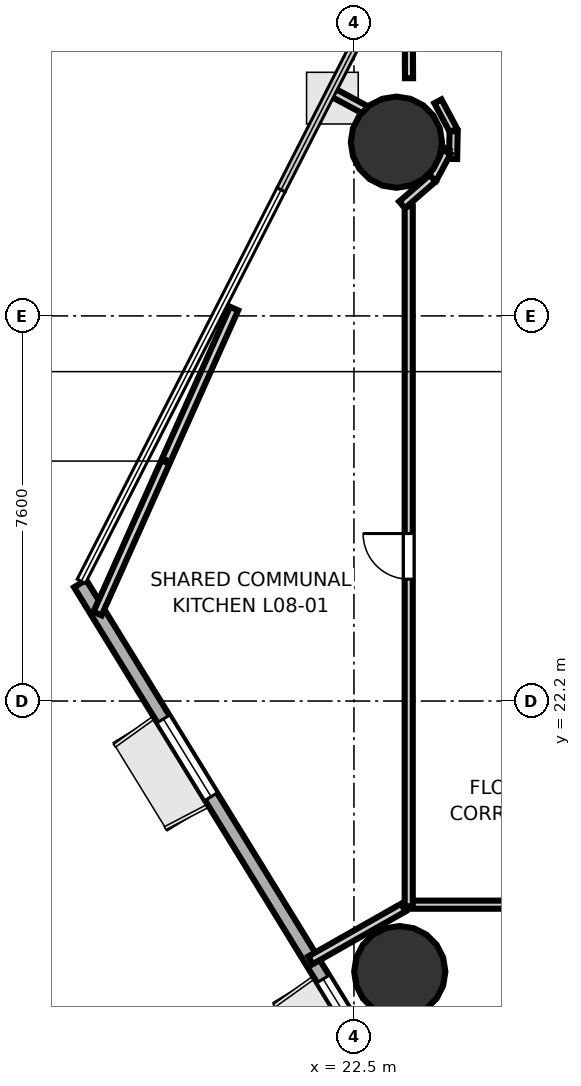
"""IFC4 building model, lengths in metres.
Left out: names, types, materials, properties, quantities, classifications, styles, units other than length and angle.
Written with IfcOpenShell. Run it as: python <this file> out.ifc"""

import sys

from ifc_helpers import new_model, si_unit, direction, frame, frame_2d, origin, origin_2d, place, context, subcontext, project, spatial, rectangle, hollow_circle, extrude, element, fill, save


model = new_model("IFC4")
c1 = context("Model", 3, precision=1e-05, world=origin(), true_north=direction((0.0, 1.0)))
c2 = subcontext(c1, "Body", "Model", "MODEL_VIEW")
j1 = project(units=[si_unit("LENGTHUNIT", "METRE"), si_unit("PLANEANGLEUNIT", "RADIAN")], contexts=[c1])
p1 = place(None, origin())
s1 = spatial("IfcSite", under=j1, at=p1, CompositionType="ELEMENT")
p2 = place(p1, origin())
s2 = spatial("IfcBuilding", under=s1, at=p2, CompositionType="ELEMENT")
p3 = place(p2, frame((0.0, 0.0, 36.8)))
s3 = spatial("IfcBuildingStorey", under=s2, at=p3, CompositionType="ELEMENT", Elevation=36.8)
for number, where, z_axis, x_axis in (
    (1, (23.338, 33.228, 0.0), (0.0, 0.0, 1.0), (1.0, 0.0, 0.0)),
    (2, (23.404, 16.86, 0.0), (0.0, 0.0, 1.0), (1.0, 0.0, 0.0)),
):
    element("IfcColumn", number, at=place(p3, frame(where, z_axis=z_axis, x_axis=x_axis)), inside=s3, PredefinedType="COLUMN", context=c2, shape_type="SweptSolid", body=[
        extrude(hollow_circle(Radius=0.9, WallThickness=0.045, at=origin_2d()), origin(), (0.0, 0.0, 1.0), 3.7),
    ])
p4 = place(p3, frame((17.096, 24.519, 0.0), z_axis=(0.0, 0.0, 1.0), x_axis=(0.523599306322, -0.851964650921, 0.0)))
e3 = element("IfcWall", 3, at=p4, inside=s3, PredefinedType="SOLIDWALL", context=c2, shape_type="SweptSolid", body=[
    extrude(rectangle(XDim=13.457, YDim=0.28, at=frame_2d((6.728, 0.0))), origin(), (0.0, 0.0, 1.0), 3.52),
])
p5 = place(p4, frame((3.137, 0.0, 0.85)))
e4 = element("IfcOpeningElement", 4, at=p5, cuts=e3, PredefinedType="OPENING", context=c2, shape_type="SweptSolid", body=[
    extrude(rectangle(XDim=1.8, YDim=2.1, at=frame_2d((0.9, 1.05))), frame((0.0, 0.15, 0.0), z_axis=(0.0, -1.0, 0.0), x_axis=(1.0, 0.0, 0.0)), (0.0, 0.0, 1.0), 0.3),
])
p6 = place(p4, frame((9.16, 0.0, 0.85)))
e5 = element("IfcOpeningElement", 5, at=p6, cuts=e3, PredefinedType="OPENING", context=c2, shape_type="SweptSolid", body=[
    extrude(rectangle(XDim=1.8, YDim=2.1, at=frame_2d((0.9, 1.05))), frame((0.0, 0.15, 0.0), z_axis=(0.0, -1.0, 0.0), x_axis=(1.0, 0.0, 0.0)), (0.0, 0.0, 1.0), 0.3),
])
p7 = place(p3, frame((24.464, 33.461, 0.0), z_axis=(0.0, 0.0, 1.0), x_axis=(-0.4715232649, 0.881853622014, 0.0)))
e6 = element("IfcWall", 6, at=p7, inside=s3, PredefinedType="PARTITIONING", context=c2, shape_type="SweptSolid", body=[
    extrude(rectangle(XDim=0.65, YDim=0.16, at=frame_2d((0.325, 0.0))), origin(), (0.0, 0.0, 1.0), 2.798),
])
p8 = place(p3, frame((23.587, 34.491, 0.0), z_axis=(0.0, 0.0, 1.0), x_axis=(-0.003825594781, 0.999992682386, 0.0)))
e7 = element("IfcWall", 7, at=p8, inside=s3, PredefinedType="PARTITIONING", context=c2, shape_type="SweptSolid", body=[
    extrude(rectangle(XDim=2.744, YDim=0.16, at=frame_2d((1.372, 0.0))), origin(), (0.0, 0.0, 1.0), 2.84),
])
p9 = place(p3, frame((33.32, 18.181, 0.0), z_axis=(0.0, 0.0, 1.0), x_axis=(-1.0, 0.0, 0.0)))
e8 = element("IfcWall", 8, at=p9, inside=s3, PredefinedType="PARTITIONING", context=c2, shape_type="SweptSolid", body=[
    extrude(rectangle(XDim=9.77, YDim=0.16, at=frame_2d((4.885, 0.0))), origin(), (0.0, 0.0, 1.0), 2.798),
])
p10 = place(p9, frame((5.695, 0.0, 0.0)))
e9 = element("IfcOpeningElement", 9, at=p10, cuts=e8, PredefinedType="OPENING", context=c2, shape_type="SweptSolid", body=[
    extrude(rectangle(XDim=0.9, YDim=2.1, at=frame_2d((0.45, 1.05))), frame((0.0, 0.09, 0.0), z_axis=(0.0, -1.0, 0.0), x_axis=(1.0, 0.0, 0.0)), (0.0, 0.0, 1.0), 0.18),
])
p11 = place(p3, frame((23.581, 18.15, 0.0), z_axis=(0.0, 0.0, 1.0), x_axis=(0.0, 1.0, 0.0)))
e10 = element("IfcWall", 10, at=p11, inside=s3, PredefinedType="PARTITIONING", context=c2, shape_type="SweptSolid", body=[
    extrude(rectangle(XDim=13.81, YDim=0.16, at=frame_2d((6.905, 0.0))), origin(), (0.0, 0.0, 1.0), 2.798),
])
p12 = place(p11, frame((6.455, 0.0, 0.0)))
e11 = element("IfcOpeningElement", 11, at=p12, cuts=e10, PredefinedType="OPENING", context=c2, shape_type="SweptSolid", body=[
    extrude(rectangle(XDim=0.9, YDim=2.1, at=frame_2d((0.45, 1.05))), frame((0.0, 0.09, 0.0), z_axis=(0.0, -1.0, 0.0), x_axis=(1.0, 0.0, 0.0)), (0.0, 0.0, 1.0), 0.18),
])
p13 = place(p3, frame((24.457, 32.897, 0.0), z_axis=(0.0, 0.0, 1.0), x_axis=(0.020031598679, 0.999799347396, 0.0)))
e12 = element("IfcWall", 12, at=p13, inside=s3, PredefinedType="PARTITIONING", context=c2, shape_type="SweptSolid", body=[
    extrude(rectangle(XDim=0.548, YDim=0.16, at=frame_2d((0.274, 0.0))), origin(), (0.0, 0.0, 1.0), 2.84),
])
p14 = place(p3, frame((22.033, 34.236, 0.0), z_axis=(0.0, 0.0, 1.0), x_axis=(0.880677298997, -0.473716682239, 0.0)))
e13 = element("IfcWall", 13, at=p14, inside=s3, PredefinedType="PLUMBINGWALL", context=c2, shape_type="SweptSolid", body=[
    extrude(rectangle(XDim=2.622, YDim=0.175, at=frame_2d((1.311, 0.0))), origin(), (0.0, 0.0, 1.0), 2.095),
])
p15 = place(p3, frame((24.33, 33.036, 0.0), z_axis=(0.0, 0.0, 1.0), x_axis=(-0.473395741492, -0.880849857772, 0.0)))
e14 = element("IfcWall", 14, at=p15, inside=s3, PredefinedType="PLUMBINGWALL", context=c2, shape_type="SweptSolid", body=[
    extrude(rectangle(XDim=0.6, YDim=0.175, at=frame_2d((0.3, 0.0))), origin(), (0.0, 0.0, 1.0), 2.84),
])
p16 = place(p3, frame((24.053, 32.516, 0.0), z_axis=(0.0, 0.0, 1.0), x_axis=(-0.753993768579, -0.656881569953, 0.0)))
e15 = element("IfcWall", 15, at=p16, inside=s3, PredefinedType="PLUMBINGWALL", context=c2, shape_type="SweptSolid", body=[
    extrude(rectangle(XDim=0.8, YDim=0.175, at=frame_2d((0.4, 0.0))), origin(), (0.0, 0.0, 1.0), 2.798),
])
p17 = place(p3, frame((23.475, 18.124, 0.0), z_axis=(0.0, 0.0, 1.0), x_axis=(-0.869707412207, -0.493567641921, 0.0)))
e16 = element("IfcWall", 16, at=p17, inside=s3, PredefinedType="PLUMBINGWALL", context=c2, shape_type="SweptSolid", body=[
    extrude(rectangle(XDim=2.108, YDim=0.175, at=frame_2d((1.054, 0.0))), origin(), (0.0, 0.0, 1.0), 2.798),
])
p18 = place(p3, frame((17.44, 23.926, 0.0), z_axis=(0.0, 0.0, 1.0), x_axis=(0.408644482841, 0.912693643367, 0.0)))
e17 = element("IfcWall", 17, at=p18, inside=s3, PredefinedType="PLUMBINGWALL", context=c2, shape_type="SweptSolid", body=[
    extrude(rectangle(XDim=6.594, YDim=0.175, at=frame_2d((3.297, 0.0))), origin(), (0.0, 0.0, 1.0), 2.84),
])
p19 = place(p12, origin())
e18 = element("IfcDoor", 18, at=p19, inside=s3, OperationType="SINGLE_SWING_RIGHT", PredefinedType="DOOR", context=c2, shape_type="SweptSolid", body=[
    extrude(rectangle(XDim=0.9, YDim=2.1, at=frame_2d((0.45, 1.05))), frame((0.0, 0.025, 0.0), z_axis=(0.0, -1.0, 0.0), x_axis=(1.0, 0.0, 0.0)), (0.0, 0.0, 1.0), 0.05),
])
fill(e11, e18)
p20 = place(p5, origin())
e19 = element("IfcWindow", 19, at=p20, inside=s3, PartitioningType="SINGLE_PANEL", PredefinedType="WINDOW", context=c2, shape_type="SweptSolid", body=[
    extrude(rectangle(XDim=1.8, YDim=2.1, at=frame_2d((0.9, 1.05))), frame((0.0, 0.03, 0.0), z_axis=(0.0, -1.0, 0.0), x_axis=(1.0, 0.0, 0.0)), (0.0, 0.0, 1.0), 0.06),
])
fill(e4, e19)
p21 = place(p6, origin())
e20 = element("IfcWindow", 20, at=p21, inside=s3, PartitioningType="SINGLE_PANEL", PredefinedType="WINDOW", context=c2, shape_type="SweptSolid", body=[
    extrude(rectangle(XDim=1.8, YDim=2.1, at=frame_2d((0.9, 1.05))), frame((0.0, 0.03, 0.0), z_axis=(0.0, -1.0, 0.0), x_axis=(1.0, 0.0, 0.0)), (0.0, 0.0, 1.0), 0.06),
])
fill(e5, e20)
save(model, sys.argv[1])
